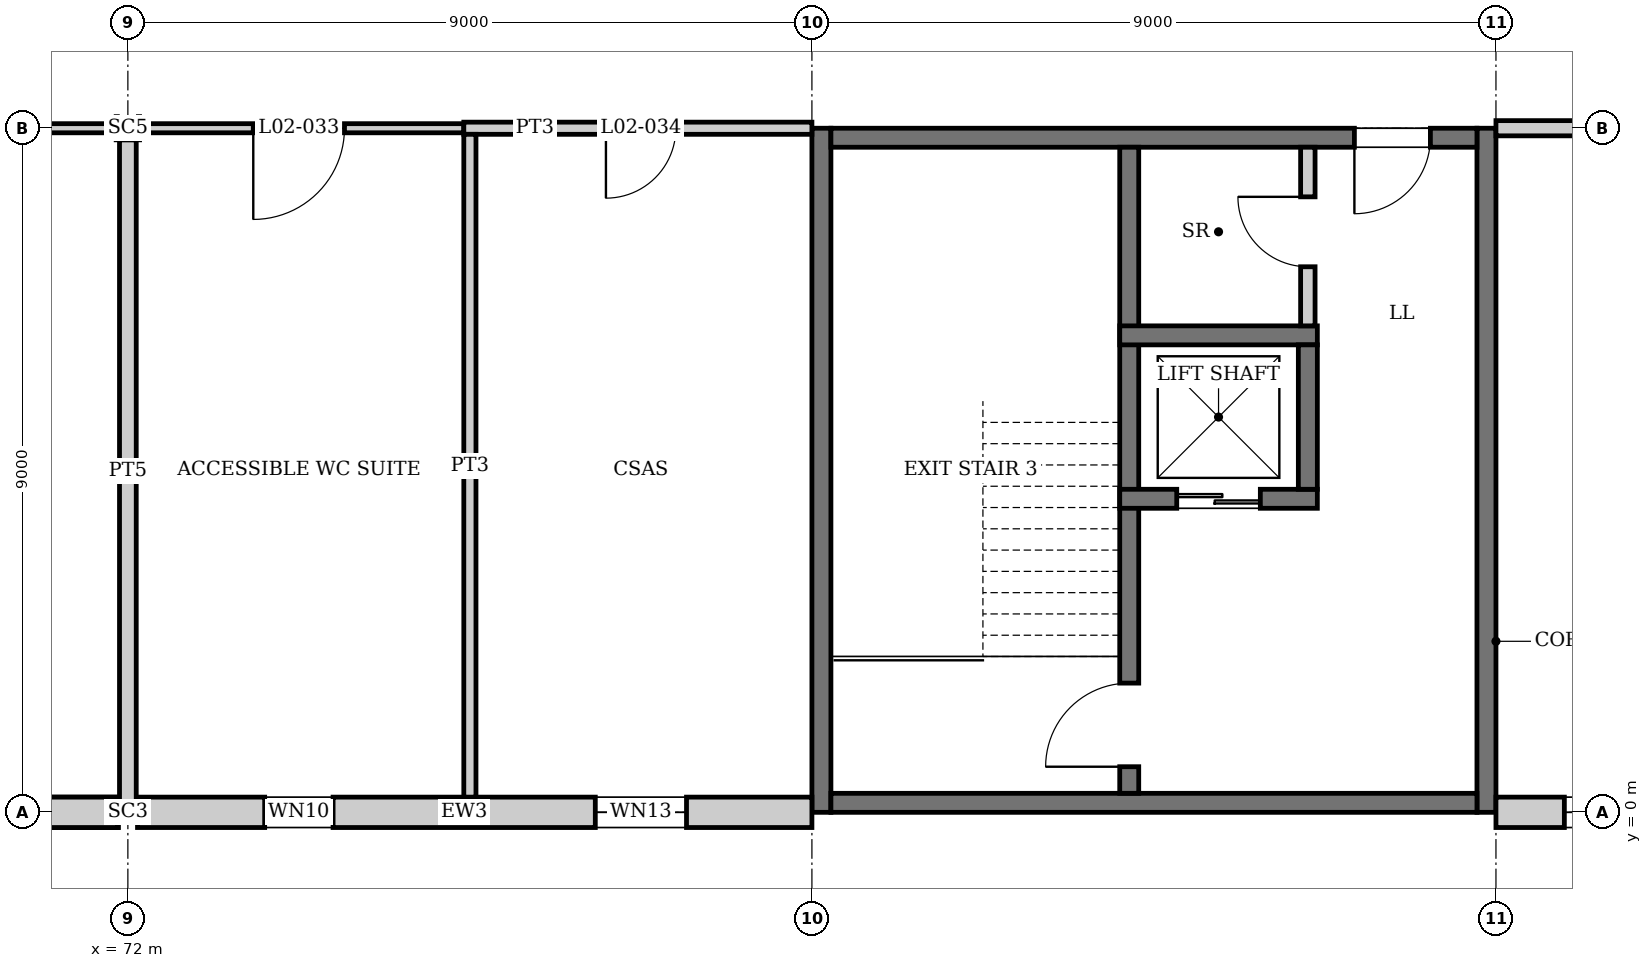
"""IFC4 building model, lengths in metres.
Left out: names, types, materials, properties, quantities, classifications, styles, units other than length and angle.
Written with IfcOpenShell. Run it as: python <this file> out.ifc"""

import sys

from ifc_helpers import new_model, si_unit, direction, frame, frame_2d, origin, origin_2d, place, context, subcontext, project, spatial, polyline, rectangle, i_section, outline, extrude, element, fill, save


model = new_model("IFC4")
c1 = context("Model", 3, precision=1e-05, world=origin(), true_north=direction((0.0, 1.0)))
c2 = subcontext(c1, "Body", "Model", "MODEL_VIEW")
j1 = project(units=[si_unit("LENGTHUNIT", "METRE"), si_unit("PLANEANGLEUNIT", "RADIAN")], contexts=[c1])
p1 = place(None, origin())
s1 = spatial("IfcSite", under=j1, at=p1, CompositionType="ELEMENT")
p2 = place(p1, origin())
s2 = spatial("IfcBuilding", under=s1, at=p2, CompositionType="ELEMENT")
p3 = place(p2, frame((0.0, 0.0, 10.5)))
s3 = spatial("IfcBuildingStorey", under=s2, at=p3, CompositionType="ELEMENT", Elevation=10.5)
p4 = place(p3, frame((72.0, 0.0, 0.0), z_axis=(0.0, 0.0, 1.0), x_axis=(0.0, 1.0, 0.0)))
e1 = element("IfcColumn", 1, at=p4, inside=s3, PredefinedType="COLUMN", context=c2, shape_type="SweptSolid", body=[
    extrude(i_section(OverallWidth=0.254, OverallDepth=0.254, WebThickness=0.009, FlangeThickness=0.014, at=origin_2d()), origin(), (0.0, 0.0, 1.0), 4.5),
])
p5 = place(p3, frame((72.0, 9.0, 0.0), z_axis=(0.0, 0.0, 1.0), x_axis=(0.0, 1.0, 0.0)))
e2 = element("IfcColumn", 2, at=p5, inside=s3, PredefinedType="COLUMN", context=c2, shape_type="SweptSolid", body=[
    extrude(i_section(OverallWidth=0.305, OverallDepth=0.308, WebThickness=0.01, FlangeThickness=0.015, at=origin_2d()), origin(), (0.0, 0.0, 1.0), 4.5),
])
for number, where, z_axis, x_axis in (
    (3, (81.125, 0.0, 0.0), (0.0, 0.0, 1.0), (0.0, 1.0, 0.0)),
    (4, (89.875, 0.0, 0.0), (0.0, 0.0, 1.0), (0.0, 1.0, 0.0)),
):
    element("IfcWall", number, at=place(p3, frame(where, z_axis=z_axis, x_axis=x_axis)), inside=s3, PredefinedType="SHEAR", context=c2, shape_type="SweptSolid", body=[
        extrude(rectangle(XDim=9.0, YDim=0.25, at=frame_2d((4.5, 0.0))), origin(), (0.0, 0.0, 1.0), 4.35),
    ])
p6 = place(p3, frame((81.25, 0.125, 0.0), z_axis=(0.0, 0.0, 1.0), x_axis=(1.0, 0.0, 0.0)))
e5 = element("IfcWall", 5, at=p6, inside=s3, PredefinedType="SHEAR", context=c2, shape_type="SweptSolid", body=[
    extrude(rectangle(XDim=8.5, YDim=0.25, at=frame_2d((4.25, 0.0))), origin(), (0.0, 0.0, 1.0), 4.35),
])
p7 = place(p3, frame((81.25, 8.875, 0.0), z_axis=(0.0, 0.0, 1.0), x_axis=(1.0, 0.0, 0.0)))
e6 = element("IfcWall", 6, at=p7, inside=s3, PredefinedType="SHEAR", context=c2, shape_type="SweptSolid", body=[
    extrude(rectangle(XDim=8.5, YDim=0.25, at=frame_2d((4.25, 0.0))), origin(), (0.0, 0.0, 1.0), 4.35),
])
p8 = place(p7, frame((6.887, 0.0, 0.0)))
e7 = element("IfcOpeningElement", 7, at=p8, cuts=e6, PredefinedType="OPENING", context=c2, shape_type="SweptSolid", body=[
    extrude(rectangle(XDim=1.0, YDim=2.1, at=frame_2d((0.5, 1.05))), frame((0.0, 0.135, 0.0), z_axis=(0.0, -1.0, 0.0), x_axis=(1.0, 0.0, 0.0)), (0.0, 0.0, 1.0), 0.27),
])
p9 = place(p3, frame((63.127, 0.0, 0.0), z_axis=(0.0, 0.0, 1.0), x_axis=(1.0, 0.0, 0.0)))
e8 = element("IfcWall", 8, at=p9, inside=s3, PredefinedType="SOLIDWALL", context=c2, shape_type="SweptSolid", body=[
    extrude(outline(polyline([(8.746, 0.0), (0.0, 0.0), (0.0, 3.86), (8.698, 0.38), (8.746, 0.5), (8.746, 0.0)])), frame((0.0, 0.2, 0.0), z_axis=(0.0, -1.0, 0.0), x_axis=(1.0, 0.0, 0.0)), (0.0, 0.0, 1.0), 0.4),
])
p10 = place(p3, frame((63.127, 0.0, 0.0), z_axis=(0.0, 0.0, 1.0), x_axis=(1.0, 0.0, 0.0)))
e9 = element("IfcWall", 9, at=p10, inside=s3, PredefinedType="SOLIDWALL", context=c2, shape_type="SweptSolid", body=[
    extrude(outline(polyline([(8.746, 3.991), (8.746, 0.64), (0.371, 3.991), (8.746, 3.991)])), frame((0.0, 0.2, 0.0), z_axis=(0.0, -1.0, 0.0), x_axis=(1.0, 0.0, 0.0)), (0.0, 0.0, 1.0), 0.4),
])
p11 = place(p3, frame((72.127, 0.0, 0.0), z_axis=(0.0, 0.0, 1.0), x_axis=(1.0, 0.0, 0.0)))
e10 = element("IfcWall", 10, at=p11, inside=s3, PredefinedType="SOLIDWALL", context=c2, shape_type="SweptSolid", body=[
    extrude(rectangle(XDim=8.873, YDim=0.4, at=frame_2d((4.437, 0.0))), origin(), (0.0, 0.0, 1.0), 3.991),
])
p12 = place(p11, frame((1.673, 0.0, 1.7)))
e11 = element("IfcOpeningElement", 11, at=p12, cuts=e10, PredefinedType="OPENING", context=c2, shape_type="SweptSolid", body=[
    extrude(rectangle(XDim=0.9, YDim=0.6, at=frame_2d((0.45, 0.3))), frame((0.0, 0.21, 0.0), z_axis=(0.0, -1.0, 0.0), x_axis=(1.0, 0.0, 0.0)), (0.0, 0.0, 1.0), 0.42),
])
p13 = place(p11, frame((6.023, 0.0, 1.2)))
e12 = element("IfcOpeningElement", 12, at=p13, cuts=e10, PredefinedType="OPENING", context=c2, shape_type="SweptSolid", body=[
    extrude(rectangle(XDim=1.2, YDim=1.2, at=frame_2d((0.6, 0.6))), frame((0.0, 0.21, 0.0), z_axis=(0.0, -1.0, 0.0), x_axis=(1.0, 0.0, 0.0)), (0.0, 0.0, 1.0), 0.42),
])
p14 = place(p3, frame((90.0, 0.0, 0.0), z_axis=(0.0, 0.0, 1.0), x_axis=(1.0, 0.0, 0.0)))
e13 = element("IfcWall", 13, at=p14, inside=s3, PredefinedType="SOLIDWALL", context=c2, shape_type="SweptSolid", body=[
    extrude(rectangle(XDim=8.873, YDim=0.4, at=frame_2d((4.437, 0.0))), origin(), (0.0, 0.0, 1.0), 3.991),
])
p15 = place(p14, frame((0.9, 0.0, 1.5)))
e14 = element("IfcOpeningElement", 14, at=p15, cuts=e13, PredefinedType="OPENING", context=c2, shape_type="SweptSolid", body=[
    extrude(rectangle(XDim=2.7, YDim=1.5, at=frame_2d((1.35, 0.75))), frame((0.0, 0.21, 0.0), z_axis=(0.0, -1.0, 0.0), x_axis=(1.0, 0.0, 0.0)), (0.0, 0.0, 1.0), 0.42),
])
p16 = place(p14, frame((5.4, 0.0, 1.5)))
e15 = element("IfcOpeningElement", 15, at=p16, cuts=e13, PredefinedType="OPENING", context=c2, shape_type="SweptSolid", body=[
    extrude(rectangle(XDim=2.7, YDim=1.5, at=frame_2d((1.35, 0.75))), frame((0.0, 0.21, 0.0), z_axis=(0.0, -1.0, 0.0), x_axis=(1.0, 0.0, 0.0)), (0.0, 0.0, 1.0), 0.42),
])
p17 = place(p3, frame((85.175, 0.25, 0.0), z_axis=(0.0, 0.0, 1.0), x_axis=(0.0, 1.0, 0.0)))
e16 = element("IfcWall", 16, at=p17, inside=s3, PredefinedType="SOLIDWALL", context=c2, shape_type="SweptSolid", body=[
    extrude(rectangle(XDim=8.5, YDim=0.25, at=frame_2d((4.25, 0.0))), origin(), (0.0, 0.0, 1.0), 4.35),
])
p18 = place(p17, frame((0.35, 0.0, 0.0)))
e17 = element("IfcOpeningElement", 17, at=p18, cuts=e16, PredefinedType="OPENING", context=c2, shape_type="SweptSolid", body=[
    extrude(rectangle(XDim=1.1, YDim=2.1, at=frame_2d((0.55, 1.05))), frame((0.0, 0.135, 0.0), z_axis=(0.0, -1.0, 0.0), x_axis=(1.0, 0.0, 0.0)), (0.0, 0.0, 1.0), 0.27),
])
p19 = place(p3, frame((85.05, 4.125, 0.0), z_axis=(0.0, 0.0, 1.0), x_axis=(1.0, 0.0, 0.0)))
e18 = element("IfcWall", 18, at=p19, inside=s3, PredefinedType="SOLIDWALL", context=c2, shape_type="SweptSolid", body=[
    extrude(rectangle(XDim=2.6, YDim=0.25, at=frame_2d((1.3, 0.0))), origin(), (0.0, 0.0, 1.0), 4.35),
])
p20 = place(p19, frame((0.75, 0.0, 0.0)))
e19 = element("IfcOpeningElement", 19, at=p20, cuts=e18, PredefinedType="OPENING", context=c2, shape_type="SweptSolid", body=[
    extrude(rectangle(XDim=1.1, YDim=2.1, at=frame_2d((0.55, 1.05))), frame((0.0, 0.135, 0.0), z_axis=(0.0, -1.0, 0.0), x_axis=(1.0, 0.0, 0.0)), (0.0, 0.0, 1.0), 0.27),
])
p21 = place(p3, frame((85.05, 6.275, 0.0), z_axis=(0.0, 0.0, 1.0), x_axis=(1.0, 0.0, 0.0)))
e20 = element("IfcWall", 20, at=p21, inside=s3, PredefinedType="SOLIDWALL", context=c2, shape_type="SweptSolid", body=[
    extrude(rectangle(XDim=2.6, YDim=0.25, at=frame_2d((1.3, 0.0))), origin(), (0.0, 0.0, 1.0), 4.35),
])
p22 = place(p3, frame((87.525, 4.25, 0.0), z_axis=(0.0, 0.0, 1.0), x_axis=(0.0, 1.0, 0.0)))
e21 = element("IfcWall", 21, at=p22, inside=s3, PredefinedType="SOLIDWALL", context=c2, shape_type="SweptSolid", body=[
    extrude(rectangle(XDim=1.9, YDim=0.25, at=frame_2d((0.95, 0.0))), origin(), (0.0, 0.0, 1.0), 4.35),
])
p23 = place(p3, frame((63.154, 9.0, 0.0), z_axis=(0.0, 0.0, 1.0), x_axis=(1.0, 0.0, 0.0)))
e22 = element("IfcWall", 22, at=p23, inside=s3, PredefinedType="PARTITIONING", context=c2, shape_type="SweptSolid", body=[
    extrude(rectangle(XDim=8.692, YDim=0.12, at=frame_2d((4.346, 0.0))), origin(), (0.0, 0.0, 1.0), 2.414),
])
p24 = place(p23, frame((3.446, 0.0, 0.0)))
e23 = element("IfcOpeningElement", 23, at=p24, cuts=e22, PredefinedType="OPENING", context=c2, shape_type="SweptSolid", body=[
    extrude(rectangle(XDim=1.8, YDim=2.1, at=frame_2d((0.9, 1.05))), frame((0.0, 0.07, 0.0), z_axis=(0.0, -1.0, 0.0), x_axis=(1.0, 0.0, 0.0)), (0.0, 0.0, 1.0), 0.14),
])
p25 = place(p3, frame((72.154, 9.0, 0.0), z_axis=(0.0, 0.0, 1.0), x_axis=(1.0, 0.0, 0.0)))
e24 = element("IfcWall", 24, at=p25, inside=s3, PredefinedType="PARTITIONING", context=c2, shape_type="SweptSolid", body=[
    extrude(rectangle(XDim=4.266, YDim=0.12, at=frame_2d((2.133, 0.0))), origin(), (0.0, 0.0, 1.0), 2.414),
])
p26 = place(p25, frame((1.496, 0.0, 0.0)))
e25 = element("IfcOpeningElement", 25, at=p26, cuts=e24, PredefinedType="OPENING", context=c2, shape_type="SweptSolid", body=[
    extrude(rectangle(XDim=1.2, YDim=2.1, at=frame_2d((0.6, 1.05))), frame((0.0, 0.07, 0.0), z_axis=(0.0, -1.0, 0.0), x_axis=(1.0, 0.0, 0.0)), (0.0, 0.0, 1.0), 0.14),
])
p27 = place(p3, frame((76.42, 9.0, 0.0), z_axis=(0.0, 0.0, 1.0), x_axis=(1.0, 0.0, 0.0)))
e26 = element("IfcWall", 26, at=p27, inside=s3, PredefinedType="PARTITIONING", context=c2, shape_type="SweptSolid", body=[
    extrude(rectangle(XDim=4.58, YDim=0.16, at=frame_2d((2.29, 0.0))), origin(), (0.0, 0.0, 1.0), 2.414),
])
p28 = place(p27, frame((1.87, 0.0, 0.0)))
e27 = element("IfcOpeningElement", 27, at=p28, cuts=e26, PredefinedType="OPENING", context=c2, shape_type="SweptSolid", body=[
    extrude(rectangle(XDim=0.92, YDim=2.1, at=frame_2d((0.46, 1.05))), frame((0.0, 0.09, 0.0), z_axis=(0.0, -1.0, 0.0), x_axis=(1.0, 0.0, 0.0)), (0.0, 0.0, 1.0), 0.18),
])
p29 = place(p3, frame((90.0, 9.0, 0.0), z_axis=(0.0, 0.0, 1.0), x_axis=(1.0, 0.0, 0.0)))
e28 = element("IfcWall", 28, at=p29, inside=s3, PredefinedType="PARTITIONING", context=c2, shape_type="SweptSolid", body=[
    extrude(rectangle(XDim=8.846, YDim=0.2, at=frame_2d((4.423, 0.0))), origin(), (0.0, 0.0, 1.0), 2.414),
])
p30 = place(p29, frame((3.9, 0.0, 0.0)))
e29 = element("IfcOpeningElement", 29, at=p30, cuts=e28, PredefinedType="OPENING", context=c2, shape_type="SweptSolid", body=[
    extrude(rectangle(XDim=1.2, YDim=2.1, at=frame_2d((0.6, 1.05))), frame((0.0, 0.11, 0.0), z_axis=(0.0, -1.0, 0.0), x_axis=(1.0, 0.0, 0.0)), (0.0, 0.0, 1.0), 0.22),
])
p31 = place(p3, frame((72.0, 0.127, 0.0), z_axis=(0.0, 0.0, 1.0), x_axis=(0.0, 1.0, 0.0)))
e30 = element("IfcWall", 30, at=p31, inside=s3, PredefinedType="PLUMBINGWALL", context=c2, shape_type="SweptSolid", body=[
    extrude(rectangle(XDim=8.719, YDim=0.22, at=frame_2d((4.359, 0.0))), origin(), (0.0, 0.0, 1.0), 3.998),
])
p32 = place(p3, frame((76.5, 0.2, 0.0), z_axis=(0.0, 0.0, 1.0), x_axis=(0.0, 1.0, 0.0)))
e31 = element("IfcWall", 31, at=p32, inside=s3, PredefinedType="PARTITIONING", context=c2, shape_type="SweptSolid", body=[
    extrude(rectangle(XDim=8.72, YDim=0.16, at=frame_2d((4.36, 0.0))), origin(), (0.0, 0.0, 1.0), 3.991),
])
p33 = place(p3, frame((87.525, 6.4, 0.0), z_axis=(0.0, 0.0, 1.0), x_axis=(0.0, 1.0, 0.0)))
e32 = element("IfcWall", 32, at=p33, inside=s3, PredefinedType="PARTITIONING", context=c2, shape_type="SweptSolid", body=[
    extrude(rectangle(XDim=2.35, YDim=0.19, at=frame_2d((1.175, 0.0))), origin(), (0.0, 0.0, 1.0), 4.35),
])
p34 = place(p33, frame((0.778, 0.0, 0.0)))
e33 = element("IfcOpeningElement", 33, at=p34, cuts=e32, PredefinedType="OPENING", context=c2, shape_type="SweptSolid", body=[
    extrude(rectangle(XDim=0.92, YDim=2.1, at=frame_2d((0.46, 1.05))), frame((0.0, 0.105, 0.0), z_axis=(0.0, -1.0, 0.0), x_axis=(1.0, 0.0, 0.0)), (0.0, 0.0, 1.0), 0.21),
])
p35 = place(p12, origin())
e34 = element("IfcWindow", 34, at=p35, inside=s3, PartitioningType="SINGLE_PANEL", PredefinedType="WINDOW", context=c2, shape_type="SweptSolid", body=[
    extrude(rectangle(XDim=0.9, YDim=0.6, at=frame_2d((0.45, 0.3))), frame((0.0, 0.03, 0.0), z_axis=(0.0, -1.0, 0.0), x_axis=(1.0, 0.0, 0.0)), (0.0, 0.0, 1.0), 0.06),
])
fill(e11, e34)
p36 = place(p13, origin())
e35 = element("IfcWindow", 35, at=p36, inside=s3, PartitioningType="SINGLE_PANEL", PredefinedType="WINDOW", context=c2, shape_type="SweptSolid", body=[
    extrude(rectangle(XDim=1.2, YDim=1.2, at=frame_2d((0.6, 0.6))), frame((0.0, 0.03, 0.0), z_axis=(0.0, -1.0, 0.0), x_axis=(1.0, 0.0, 0.0)), (0.0, 0.0, 1.0), 0.06),
])
fill(e12, e35)
p37 = place(p15, origin())
e36 = element("IfcWindow", 36, at=p37, inside=s3, PartitioningType="SINGLE_PANEL", PredefinedType="WINDOW", context=c2, shape_type="SweptSolid", body=[
    extrude(rectangle(XDim=2.7, YDim=1.5, at=frame_2d((1.35, 0.75))), frame((0.0, 0.03, 0.0), z_axis=(0.0, -1.0, 0.0), x_axis=(1.0, 0.0, 0.0)), (0.0, 0.0, 1.0), 0.06),
])
fill(e14, e36)
p38 = place(p20, origin())
e37 = element("IfcDoor", 37, at=p38, inside=s3, OperationType="DOUBLE_DOOR_SLIDING", PredefinedType="DOOR", context=c2, shape_type="SweptSolid", body=[
    extrude(rectangle(XDim=1.1, YDim=2.1, at=frame_2d((0.55, 1.05))), frame((0.0, 0.025, 0.0), z_axis=(0.0, -1.0, 0.0), x_axis=(1.0, 0.0, 0.0)), (0.0, 0.0, 1.0), 0.05),
])
fill(e19, e37)
p39 = place(p18, origin())
e38 = element("IfcDoor", 38, at=p39, inside=s3, OperationType="SINGLE_SWING_LEFT", PredefinedType="DOOR", context=c2, shape_type="SweptSolid", body=[
    extrude(rectangle(XDim=1.1, YDim=2.1, at=frame_2d((0.55, 1.05))), frame((0.0, 0.025, 0.0), z_axis=(0.0, -1.0, 0.0), x_axis=(1.0, 0.0, 0.0)), (0.0, 0.0, 1.0), 0.05),
])
fill(e17, e38)
p40 = place(p8, frame((1.0, 0.0, 0.0), z_axis=(0.0, 0.0, 1.0), x_axis=(-1.0, 0.0, 0.0)))
e39 = element("IfcDoor", 39, at=p40, inside=s3, OperationType="SINGLE_SWING_RIGHT", PredefinedType="DOOR", context=c2, shape_type="SweptSolid", body=[
    extrude(rectangle(XDim=1.0, YDim=2.1, at=frame_2d((0.5, 1.05))), frame((0.0, 0.025, 0.0), z_axis=(0.0, -1.0, 0.0), x_axis=(1.0, 0.0, 0.0)), (0.0, 0.0, 1.0), 0.05),
])
fill(e7, e39)
p41 = place(p34, origin())
e40 = element("IfcDoor", 40, at=p41, inside=s3, OperationType="SINGLE_SWING_RIGHT", PredefinedType="DOOR", context=c2, shape_type="SweptSolid", body=[
    extrude(rectangle(XDim=0.92, YDim=2.1, at=frame_2d((0.46, 1.05))), frame((0.0, 0.025, 0.0), z_axis=(0.0, -1.0, 0.0), x_axis=(1.0, 0.0, 0.0)), (0.0, 0.0, 1.0), 0.05),
])
fill(e33, e40)
p42 = place(p26, frame((1.2, 0.0, 0.0), z_axis=(0.0, 0.0, 1.0), x_axis=(-1.0, 0.0, 0.0)))
e41 = element("IfcDoor", 41, at=p42, inside=s3, OperationType="SINGLE_SWING_RIGHT", PredefinedType="DOOR", context=c2, shape_type="SweptSolid", body=[
    extrude(rectangle(XDim=1.2, YDim=2.1, at=frame_2d((0.6, 1.05))), frame((0.0, 0.025, 0.0), z_axis=(0.0, -1.0, 0.0), x_axis=(1.0, 0.0, 0.0)), (0.0, 0.0, 1.0), 0.05),
])
fill(e25, e41)
p43 = place(p28, frame((0.92, 0.0, 0.0), z_axis=(0.0, 0.0, 1.0), x_axis=(-1.0, 0.0, 0.0)))
e42 = element("IfcDoor", 42, at=p43, inside=s3, OperationType="SINGLE_SWING_RIGHT", PredefinedType="DOOR", context=c2, shape_type="SweptSolid", body=[
    extrude(rectangle(XDim=0.92, YDim=2.1, at=frame_2d((0.46, 1.05))), frame((0.0, 0.025, 0.0), z_axis=(0.0, -1.0, 0.0), x_axis=(1.0, 0.0, 0.0)), (0.0, 0.0, 1.0), 0.05),
])
fill(e27, e42)
save(model, sys.argv[1])
